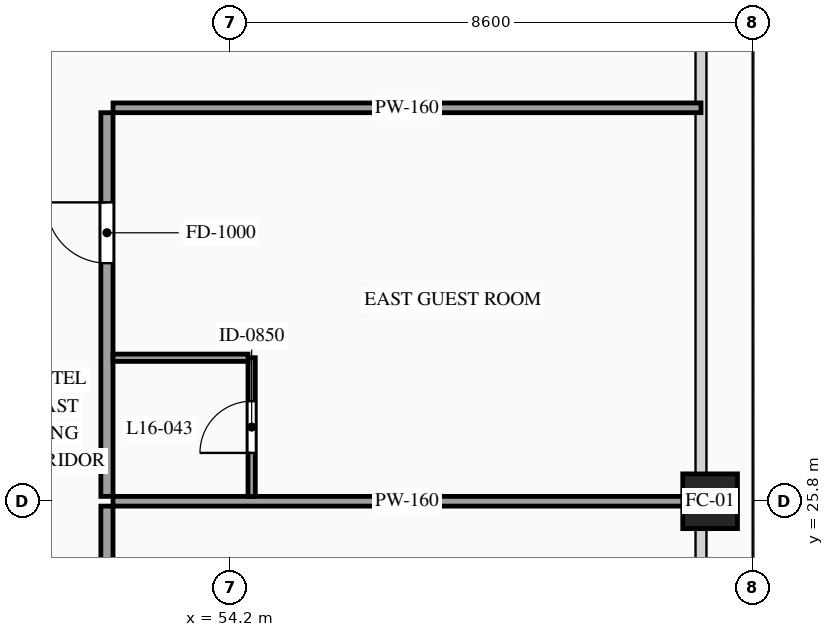
"""IFC4 building model, lengths in metres.
Left out: names, types, materials, properties, quantities, classifications, styles, units other than length and angle.
Written with IfcOpenShell. Run it as: python <this file> out.ifc"""

import sys

from ifc_helpers import new_model, si_unit, direction, frame, frame_2d, origin, origin_2d, place, context, subcontext, project, spatial, rectangle, hollow_rectangle, extrude, source, transform, mapped, element, fill, save


model = new_model("IFC4")
c1 = context("Model", 3, precision=1e-05, world=origin(), true_north=direction((0.0, 1.0)))
c2 = subcontext(c1, "Body", "Model", "MODEL_VIEW")
j1 = project(units=[si_unit("LENGTHUNIT", "METRE"), si_unit("PLANEANGLEUNIT", "RADIAN")], contexts=[c1])
p1 = place(None, origin())
s1 = spatial("IfcSite", under=j1, at=p1, CompositionType="ELEMENT")
p2 = place(p1, origin())
s2 = spatial("IfcBuilding", under=s1, at=p2, CompositionType="ELEMENT")
p3 = place(p2, frame((0.0, 0.0, 64.0)))
s3 = spatial("IfcBuildingStorey", under=s2, at=p3, CompositionType="ELEMENT", Elevation=64.0)
m1 = source(origin(), c2, "Body", "SweptSolid", [
    extrude(hollow_rectangle(XDim=0.9, YDim=0.9, WallThickness=0.042, at=origin_2d()), origin(), (0.0, 0.0, 1.0), 3.6),
])
p4 = place(p3, frame((62.1, 25.8, 0.0), z_axis=(0.0, 0.0, 1.0), x_axis=(1.0, 0.0, 0.0)))
e1 = element("IfcColumn", 1, at=p4, inside=s3, PredefinedType="COLUMN", context=c2, shape_type="MappedRepresentation", body=[
    mapped(m1, transform((0.0, 0.0, 0.0), scale=1.0)),
])
p5 = place(p3, frame((52.18, 19.41, 0.0), z_axis=(0.0, 0.0, 1.0), x_axis=(0.0, 1.0, 0.0)))
e2 = element("IfcWall", 2, at=p5, inside=s3, PredefinedType="PARTITIONING", context=c2, shape_type="SweptSolid", body=[
    extrude(rectangle(XDim=6.31, YDim=0.2, at=frame_2d((3.155, 0.0))), origin(), (0.0, 0.0, 1.0), 3.38),
])
p6 = place(p5, frame((3.835, 0.0, 0.0)))
e3 = element("IfcOpeningElement", 3, at=p6, cuts=e2, PredefinedType="OPENING", context=c2, shape_type="SweptSolid", body=[
    extrude(rectangle(XDim=1.0, YDim=2.2, at=frame_2d((0.5, 1.1))), frame((0.0, 0.115, 0.0), z_axis=(0.0, -1.0, 0.0), x_axis=(1.0, 0.0, 0.0)), (0.0, 0.0, 1.0), 0.23),
])
m2 = source(origin(), c2, "Body", "SweptSolid", [
    extrude(rectangle(XDim=9.67, YDim=0.16, at=frame_2d((4.835, 0.0))), origin(), (0.0, 0.0, 1.0), 2.575),
])
p7 = place(p3, frame((52.28, 25.8, 0.0), z_axis=(0.0, 0.0, 1.0), x_axis=(1.0, 0.0, 0.0)))
e4 = element("IfcWall", 4, at=p7, inside=s3, PredefinedType="PARTITIONING", context=c2, shape_type="MappedRepresentation", body=[
    mapped(m2, transform((0.0, 0.0, 0.0), scale=1.0)),
])
p8 = place(p3, frame((52.18, 25.88, 0.0), z_axis=(0.0, 0.0, 1.0), x_axis=(0.0, 1.0, 0.0)))
e5 = element("IfcWall", 5, at=p8, inside=s3, PredefinedType="PARTITIONING", context=c2, shape_type="SweptSolid", body=[
    extrude(rectangle(XDim=6.31, YDim=0.2, at=frame_2d((3.155, 0.0))), origin(), (0.0, 0.0, 1.0), 3.38),
])
p9 = place(p8, frame((3.835, 0.0, 0.0)))
e6 = element("IfcOpeningElement", 6, at=p9, cuts=e5, PredefinedType="OPENING", context=c2, shape_type="SweptSolid", body=[
    extrude(rectangle(XDim=1.0, YDim=2.2, at=frame_2d((0.5, 1.1))), frame((0.0, 0.115, 0.0), z_axis=(0.0, -1.0, 0.0), x_axis=(1.0, 0.0, 0.0)), (0.0, 0.0, 1.0), 0.23),
])
m3 = source(origin(), c2, "Body", "SweptSolid", [
    extrude(rectangle(XDim=9.67, YDim=0.16, at=frame_2d((4.835, 0.0))), origin(), (0.0, 0.0, 1.0), 2.875),
])
p10 = place(p3, frame((52.28, 32.27, 0.0), z_axis=(0.0, 0.0, 1.0), x_axis=(1.0, 0.0, 0.0)))
e7 = element("IfcWall", 7, at=p10, inside=s3, PredefinedType="PARTITIONING", context=c2, shape_type="MappedRepresentation", body=[
    mapped(m3, transform((0.0, 0.0, 0.0), scale=1.0)),
])
p11 = place(p3, frame((54.56, 25.88, 0.0), z_axis=(0.0, 0.0, 1.0), x_axis=(0.0, 1.0, 0.0)))
e8 = element("IfcWall", 8, at=p11, inside=s3, PredefinedType="PARTITIONING", context=c2, shape_type="SweptSolid", body=[
    extrude(rectangle(XDim=2.28, YDim=0.12, at=frame_2d((1.14, 0.0))), origin(), (0.0, 0.0, 1.0), 3.38),
])
p12 = place(p11, frame((0.715, 0.0, 0.0)))
e9 = element("IfcOpeningElement", 9, at=p12, cuts=e8, PredefinedType="OPENING", context=c2, shape_type="SweptSolid", body=[
    extrude(rectangle(XDim=0.85, YDim=2.1, at=frame_2d((0.425, 1.05))), frame((0.0, 0.075, 0.0), z_axis=(0.0, -1.0, 0.0), x_axis=(1.0, 0.0, 0.0)), (0.0, 0.0, 1.0), 0.15),
])
m4 = source(origin(), c2, "Body", "SweptSolid", [
    extrude(rectangle(XDim=2.22, YDim=0.12, at=frame_2d((1.11, 0.0))), origin(), (0.0, 0.0, 1.0), 3.38),
])
p13 = place(p3, frame((52.28, 28.16, 0.0), z_axis=(0.0, 0.0, 1.0), x_axis=(1.0, 0.0, 0.0)))
e10 = element("IfcWall", 10, at=p13, inside=s3, PredefinedType="PARTITIONING", context=c2, shape_type="MappedRepresentation", body=[
    mapped(m4, transform((0.0, 0.0, 0.0), scale=1.0)),
])
m5 = source(origin(), c2, "Body", "SweptSolid", [
    extrude(rectangle(XDim=1.0, YDim=2.2, at=frame_2d((0.5, 1.1))), frame((0.0, 0.025, 0.0), z_axis=(0.0, -1.0, 0.0), x_axis=(1.0, 0.0, 0.0)), (0.0, 0.0, 1.0), 0.05),
])
p14 = place(p9, origin())
e11 = element("IfcDoor", 11, at=p14, inside=s3, OperationType="SINGLE_SWING_RIGHT", PredefinedType="DOOR", context=c2, shape_type="MappedRepresentation", body=[
    mapped(m5, transform((0.0, 0.0, 0.0), scale=1.0)),
])
fill(e6, e11)
m6 = source(origin(), c2, "Body", "SweptSolid", [
    extrude(rectangle(XDim=0.85, YDim=2.1, at=frame_2d((0.425, 1.05))), frame((0.0, 0.025, 0.0), z_axis=(0.0, -1.0, 0.0), x_axis=(1.0, 0.0, 0.0)), (0.0, 0.0, 1.0), 0.05),
])
p15 = place(p12, origin())
e12 = element("IfcDoor", 12, at=p15, inside=s3, OperationType="SINGLE_SWING_LEFT", PredefinedType="DOOR", context=c2, shape_type="MappedRepresentation", body=[
    mapped(m6, transform((0.0, 0.0, 0.0), scale=1.0)),
])
fill(e9, e12)
save(model, sys.argv[1])
